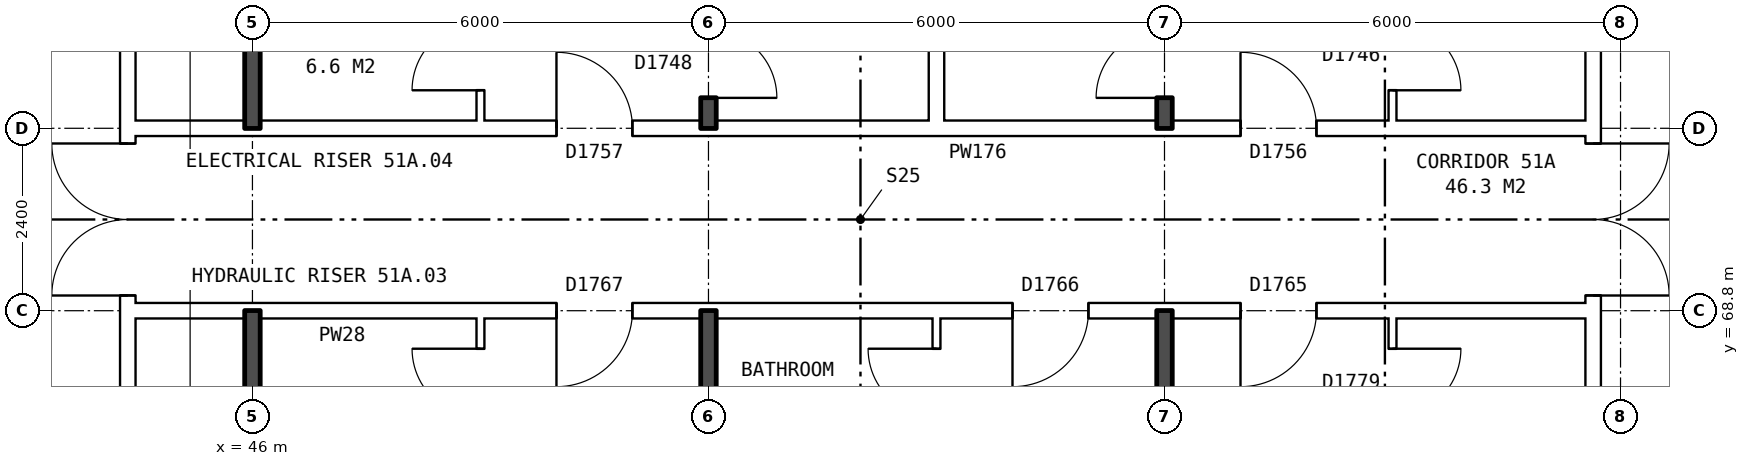
"""IFC4 building model, lengths in metres.
Left out: names, types, materials, properties, quantities, classifications, styles, units other than length and angle.
Written with IfcOpenShell. Run it as: python <this file> out.ifc"""

import sys

from ifc_helpers import new_model, si_unit, direction, frame, frame_2d, origin, place, context, subcontext, project, spatial, rectangle, extrude, element, fill, save


model = new_model("IFC4")
c1 = context("Model", 3, precision=1e-05, world=origin(), true_north=direction((0.0, 1.0)))
c2 = subcontext(c1, "Body", "Model", "MODEL_VIEW")
j1 = project(units=[si_unit("LENGTHUNIT", "METRE"), si_unit("PLANEANGLEUNIT", "RADIAN")], contexts=[c1])
p1 = place(None, origin())
s1 = spatial("IfcSite", under=j1, at=p1, CompositionType="ELEMENT")
p2 = place(p1, origin())
s2 = spatial("IfcBuilding", under=s1, at=p2, CompositionType="ELEMENT")
p3 = place(p2, frame((0.0, 0.0, 182.0)))
s3 = spatial("IfcBuildingStorey", under=s2, at=p3, CompositionType="ELEMENT", Elevation=182.0)
p4 = place(p3, frame((63.64, 63.9, 0.0), z_axis=(0.0, 0.0, 1.0), x_axis=(0.0, 1.0, 0.0)))
e1 = element("IfcWall", 1, at=p4, inside=s3, PredefinedType="PARTITIONING", context=c2, shape_type="SweptSolid", body=[
    extrude(rectangle(XDim=12.2, YDim=0.2, at=frame_2d((6.1, 0.0))), origin(), (0.0, 0.0, 1.0), 2.85),
])
p5 = place(p4, frame((5.1, 0.0, 0.0)))
e2 = element("IfcOpeningElement", 2, at=p5, cuts=e1, PredefinedType="OPENING", context=c2, shape_type="SweptSolid", body=[
    extrude(rectangle(XDim=2.0, YDim=2.1, at=frame_2d((1.0, 1.05))), frame((0.0, 0.11, 0.0), z_axis=(0.0, -1.0, 0.0), x_axis=(1.0, 0.0, 0.0)), (0.0, 0.0, 1.0), 0.22),
])
p6 = place(p3, frame((44.36, 63.9, 0.0), z_axis=(0.0, 0.0, 1.0), x_axis=(0.0, 1.0, 0.0)))
e3 = element("IfcWall", 3, at=p6, inside=s3, PredefinedType="PARTITIONING", context=c2, shape_type="SweptSolid", body=[
    extrude(rectangle(XDim=12.2, YDim=0.2, at=frame_2d((6.1, 0.0))), origin(), (0.0, 0.0, 1.0), 2.85),
])
p7 = place(p6, frame((5.1, 0.0, 0.0)))
e4 = element("IfcOpeningElement", 4, at=p7, cuts=e3, PredefinedType="OPENING", context=c2, shape_type="SweptSolid", body=[
    extrude(rectangle(XDim=2.0, YDim=2.1, at=frame_2d((1.0, 1.05))), frame((0.0, 0.11, 0.0), z_axis=(0.0, -1.0, 0.0), x_axis=(1.0, 0.0, 0.0)), (0.0, 0.0, 1.0), 0.22),
])
p8 = place(p3, frame((44.36, 68.8, 0.0), z_axis=(0.0, 0.0, 1.0), x_axis=(1.0, 0.0, 0.0)))
e5 = element("IfcWall", 5, at=p8, inside=s3, PredefinedType="PARTITIONING", context=c2, shape_type="SweptSolid", body=[
    extrude(rectangle(XDim=19.28, YDim=0.2, at=frame_2d((9.64, 0.0))), origin(), (0.0, 0.0, 1.0), 2.85),
])
p9 = place(p8, frame((14.64, 0.0, 0.0)))
e6 = element("IfcOpeningElement", 6, at=p9, cuts=e5, PredefinedType="OPENING", context=c2, shape_type="SweptSolid", body=[
    extrude(rectangle(XDim=1.0, YDim=2.1, at=frame_2d((0.5, 1.05))), frame((0.0, 0.11, 0.0), z_axis=(0.0, -1.0, 0.0), x_axis=(1.0, 0.0, 0.0)), (0.0, 0.0, 1.0), 0.22),
])
p10 = place(p8, frame((11.64, 0.0, 0.0)))
e7 = element("IfcOpeningElement", 7, at=p10, cuts=e5, PredefinedType="OPENING", context=c2, shape_type="SweptSolid", body=[
    extrude(rectangle(XDim=1.0, YDim=2.1, at=frame_2d((0.5, 1.05))), frame((0.0, 0.11, 0.0), z_axis=(0.0, -1.0, 0.0), x_axis=(1.0, 0.0, 0.0)), (0.0, 0.0, 1.0), 0.22),
])
p11 = place(p8, frame((5.64, 0.0, 0.0)))
e8 = element("IfcOpeningElement", 8, at=p11, cuts=e5, PredefinedType="OPENING", context=c2, shape_type="SweptSolid", body=[
    extrude(rectangle(XDim=1.0, YDim=2.1, at=frame_2d((0.5, 1.05))), frame((0.0, 0.11, 0.0), z_axis=(0.0, -1.0, 0.0), x_axis=(1.0, 0.0, 0.0)), (0.0, 0.0, 1.0), 0.22),
])
p12 = place(p3, frame((44.36, 71.2, 0.0), z_axis=(0.0, 0.0, 1.0), x_axis=(1.0, 0.0, 0.0)))
e9 = element("IfcWall", 9, at=p12, inside=s3, PredefinedType="PARTITIONING", context=c2, shape_type="SweptSolid", body=[
    extrude(rectangle(XDim=19.28, YDim=0.2, at=frame_2d((9.64, 0.0))), origin(), (0.0, 0.0, 1.0), 2.85),
])
p13 = place(p12, frame((14.64, 0.0, 0.0)))
e10 = element("IfcOpeningElement", 10, at=p13, cuts=e9, PredefinedType="OPENING", context=c2, shape_type="SweptSolid", body=[
    extrude(rectangle(XDim=1.0, YDim=2.1, at=frame_2d((0.5, 1.05))), frame((0.0, 0.11, 0.0), z_axis=(0.0, -1.0, 0.0), x_axis=(1.0, 0.0, 0.0)), (0.0, 0.0, 1.0), 0.22),
])
p14 = place(p12, frame((5.64, 0.0, 0.0)))
e11 = element("IfcOpeningElement", 11, at=p14, cuts=e9, PredefinedType="OPENING", context=c2, shape_type="SweptSolid", body=[
    extrude(rectangle(XDim=1.0, YDim=2.1, at=frame_2d((0.5, 1.05))), frame((0.0, 0.11, 0.0), z_axis=(0.0, -1.0, 0.0), x_axis=(1.0, 0.0, 0.0)), (0.0, 0.0, 1.0), 0.22),
])
for number, where, z_axis, x_axis in (
    (12, (46.0, 63.8, 0.0), (0.0, 0.0, 1.0), (0.0, 1.0, 0.0)),
    (13, (46.0, 71.2, 0.0), (0.0, 0.0, 1.0), (0.0, 1.0, 0.0)),
):
    element("IfcWall", number, at=place(p3, frame(where, z_axis=z_axis, x_axis=x_axis)), inside=s3, PredefinedType="SOLIDWALL", context=c2, shape_type="SweptSolid", body=[
        extrude(rectangle(XDim=5.0, YDim=0.2, at=frame_2d((2.5, 0.0))), origin(), (0.0, 0.0, 1.0), 2.85),
    ])
p15 = place(p3, frame((49.0, 54.36, 0.0), z_axis=(0.0, 0.0, 1.0), x_axis=(0.0, 1.0, 0.0)))
e14 = element("IfcWall", 14, at=p15, inside=s3, PredefinedType="PARTITIONING", context=c2, shape_type="SweptSolid", body=[
    extrude(rectangle(XDim=14.34, YDim=0.1, at=frame_2d((7.17, 0.0))), origin(), (0.0, 0.0, 1.0), 2.85),
])
p16 = place(p15, frame((6.7, 0.0, 0.0)))
e15 = element("IfcOpeningElement", 15, at=p16, cuts=e14, PredefinedType="OPENING", context=c2, shape_type="SweptSolid", body=[
    extrude(rectangle(XDim=0.9, YDim=2.1, at=frame_2d((0.45, 1.05))), frame((0.0, 0.06, 0.0), z_axis=(0.0, -1.0, 0.0), x_axis=(1.0, 0.0, 0.0)), (0.0, 0.0, 1.0), 0.12),
])
p17 = place(p15, frame((13.04, 0.0, 0.0)))
e16 = element("IfcOpeningElement", 16, at=p17, cuts=e14, PredefinedType="OPENING", context=c2, shape_type="SweptSolid", body=[
    extrude(rectangle(XDim=0.9, YDim=2.1, at=frame_2d((0.45, 1.05))), frame((0.0, 0.06, 0.0), z_axis=(0.0, -1.0, 0.0), x_axis=(1.0, 0.0, 0.0)), (0.0, 0.0, 1.0), 0.12),
])
p18 = place(p3, frame((49.0, 71.3, 0.0), z_axis=(0.0, 0.0, 1.0), x_axis=(0.0, 1.0, 0.0)))
e17 = element("IfcWall", 17, at=p18, inside=s3, PredefinedType="PARTITIONING", context=c2, shape_type="SweptSolid", body=[
    extrude(rectangle(XDim=14.34, YDim=0.1, at=frame_2d((7.17, 0.0))), origin(), (0.0, 0.0, 1.0), 2.85),
])
p19 = place(p18, frame((9.24, 0.0, 0.0)))
e18 = element("IfcOpeningElement", 18, at=p19, cuts=e17, PredefinedType="OPENING", context=c2, shape_type="SweptSolid", body=[
    extrude(rectangle(XDim=0.9, YDim=2.1, at=frame_2d((0.45, 1.05))), frame((0.0, 0.06, 0.0), z_axis=(0.0, -1.0, 0.0), x_axis=(1.0, 0.0, 0.0)), (0.0, 0.0, 1.0), 0.12),
])
p20 = place(p18, frame((0.4, 0.0, 0.0)))
e19 = element("IfcOpeningElement", 19, at=p20, cuts=e17, PredefinedType="OPENING", context=c2, shape_type="SweptSolid", body=[
    extrude(rectangle(XDim=0.9, YDim=2.1, at=frame_2d((0.45, 1.05))), frame((0.0, 0.06, 0.0), z_axis=(0.0, -1.0, 0.0), x_axis=(1.0, 0.0, 0.0)), (0.0, 0.0, 1.0), 0.12),
])
p21 = place(p3, frame((52.0, 54.36, 0.0), z_axis=(0.0, 0.0, 1.0), x_axis=(0.0, 1.0, 0.0)))
e20 = element("IfcWall", 20, at=p21, inside=s3, PredefinedType="SOLIDWALL", context=c2, shape_type="SweptSolid", body=[
    extrude(rectangle(XDim=14.44, YDim=0.2, at=frame_2d((7.22, 0.0))), origin(), (0.0, 0.0, 1.0), 2.85),
])
p22 = place(p3, frame((52.0, 71.2, 0.0), z_axis=(0.0, 0.0, 1.0), x_axis=(0.0, 1.0, 0.0)))
e21 = element("IfcWall", 21, at=p22, inside=s3, PredefinedType="SOLIDWALL", context=c2, shape_type="SweptSolid", body=[
    extrude(rectangle(XDim=14.44, YDim=0.2, at=frame_2d((7.22, 0.0))), origin(), (0.0, 0.0, 1.0), 2.85),
])
p23 = place(p22, frame((9.34, 0.0, 0.0)))
e22 = element("IfcOpeningElement", 22, at=p23, cuts=e21, PredefinedType="OPENING", context=c2, shape_type="SweptSolid", body=[
    extrude(rectangle(XDim=0.9, YDim=2.1, at=frame_2d((0.45, 1.05))), frame((0.0, 0.11, 0.0), z_axis=(0.0, -1.0, 0.0), x_axis=(1.0, 0.0, 0.0)), (0.0, 0.0, 1.0), 0.22),
])
p24 = place(p22, frame((0.4, 0.0, 0.0)))
e23 = element("IfcOpeningElement", 23, at=p24, cuts=e21, PredefinedType="OPENING", context=c2, shape_type="SweptSolid", body=[
    extrude(rectangle(XDim=0.9, YDim=2.1, at=frame_2d((0.45, 1.05))), frame((0.0, 0.11, 0.0), z_axis=(0.0, -1.0, 0.0), x_axis=(1.0, 0.0, 0.0)), (0.0, 0.0, 1.0), 0.22),
])
p25 = place(p3, frame((55.0, 54.36, 0.0), z_axis=(0.0, 0.0, 1.0), x_axis=(0.0, 1.0, 0.0)))
e24 = element("IfcWall", 24, at=p25, inside=s3, PredefinedType="PARTITIONING", context=c2, shape_type="SweptSolid", body=[
    extrude(rectangle(XDim=14.34, YDim=0.1, at=frame_2d((7.17, 0.0))), origin(), (0.0, 0.0, 1.0), 2.85),
])
p26 = place(p25, frame((4.2, 0.0, 0.0)))
e25 = element("IfcOpeningElement", 25, at=p26, cuts=e24, PredefinedType="OPENING", context=c2, shape_type="SweptSolid", body=[
    extrude(rectangle(XDim=0.9, YDim=2.1, at=frame_2d((0.45, 1.05))), frame((0.0, 0.06, 0.0), z_axis=(0.0, -1.0, 0.0), x_axis=(1.0, 0.0, 0.0)), (0.0, 0.0, 1.0), 0.12),
])
p27 = place(p25, frame((13.04, 0.0, 0.0)))
e26 = element("IfcOpeningElement", 26, at=p27, cuts=e24, PredefinedType="OPENING", context=c2, shape_type="SweptSolid", body=[
    extrude(rectangle(XDim=0.9, YDim=2.1, at=frame_2d((0.45, 1.05))), frame((0.0, 0.06, 0.0), z_axis=(0.0, -1.0, 0.0), x_axis=(1.0, 0.0, 0.0)), (0.0, 0.0, 1.0), 0.12),
])
p28 = place(p3, frame((55.0, 71.3, 0.0), z_axis=(0.0, 0.0, 1.0), x_axis=(0.0, 1.0, 0.0)))
e27 = element("IfcWall", 27, at=p28, inside=s3, PredefinedType="PARTITIONING", context=c2, shape_type="SweptSolid", body=[
    extrude(rectangle(XDim=14.34, YDim=0.2, at=frame_2d((7.17, 0.0))), origin(), (0.0, 0.0, 1.0), 2.85),
])
p29 = place(p3, frame((58.0, 54.36, 0.0), z_axis=(0.0, 0.0, 1.0), x_axis=(0.0, 1.0, 0.0)))
e28 = element("IfcWall", 28, at=p29, inside=s3, PredefinedType="SOLIDWALL", context=c2, shape_type="SweptSolid", body=[
    extrude(rectangle(XDim=14.44, YDim=0.2, at=frame_2d((7.22, 0.0))), origin(), (0.0, 0.0, 1.0), 2.85),
])
p30 = place(p3, frame((58.0, 71.2, 0.0), z_axis=(0.0, 0.0, 1.0), x_axis=(0.0, 1.0, 0.0)))
e29 = element("IfcWall", 29, at=p30, inside=s3, PredefinedType="SOLIDWALL", context=c2, shape_type="SweptSolid", body=[
    extrude(rectangle(XDim=14.44, YDim=0.2, at=frame_2d((7.22, 0.0))), origin(), (0.0, 0.0, 1.0), 2.85),
])
p31 = place(p30, frame((9.34, 0.0, 0.0)))
e30 = element("IfcOpeningElement", 30, at=p31, cuts=e29, PredefinedType="OPENING", context=c2, shape_type="SweptSolid", body=[
    extrude(rectangle(XDim=0.9, YDim=2.1, at=frame_2d((0.45, 1.05))), frame((0.0, 0.11, 0.0), z_axis=(0.0, -1.0, 0.0), x_axis=(1.0, 0.0, 0.0)), (0.0, 0.0, 1.0), 0.22),
])
p32 = place(p30, frame((0.4, 0.0, 0.0)))
e31 = element("IfcOpeningElement", 31, at=p32, cuts=e29, PredefinedType="OPENING", context=c2, shape_type="SweptSolid", body=[
    extrude(rectangle(XDim=0.9, YDim=2.1, at=frame_2d((0.45, 1.05))), frame((0.0, 0.11, 0.0), z_axis=(0.0, -1.0, 0.0), x_axis=(1.0, 0.0, 0.0)), (0.0, 0.0, 1.0), 0.22),
])
p33 = place(p3, frame((61.0, 54.36, 0.0), z_axis=(0.0, 0.0, 1.0), x_axis=(0.0, 1.0, 0.0)))
e32 = element("IfcWall", 32, at=p33, inside=s3, PredefinedType="PARTITIONING", context=c2, shape_type="SweptSolid", body=[
    extrude(rectangle(XDim=14.34, YDim=0.1, at=frame_2d((7.17, 0.0))), origin(), (0.0, 0.0, 1.0), 2.85),
])
p34 = place(p33, frame((6.7, 0.0, 0.0)))
e33 = element("IfcOpeningElement", 33, at=p34, cuts=e32, PredefinedType="OPENING", context=c2, shape_type="SweptSolid", body=[
    extrude(rectangle(XDim=0.9, YDim=2.1, at=frame_2d((0.45, 1.05))), frame((0.0, 0.06, 0.0), z_axis=(0.0, -1.0, 0.0), x_axis=(1.0, 0.0, 0.0)), (0.0, 0.0, 1.0), 0.12),
])
p35 = place(p33, frame((13.04, 0.0, 0.0)))
e34 = element("IfcOpeningElement", 34, at=p35, cuts=e32, PredefinedType="OPENING", context=c2, shape_type="SweptSolid", body=[
    extrude(rectangle(XDim=0.9, YDim=2.1, at=frame_2d((0.45, 1.05))), frame((0.0, 0.06, 0.0), z_axis=(0.0, -1.0, 0.0), x_axis=(1.0, 0.0, 0.0)), (0.0, 0.0, 1.0), 0.12),
])
p36 = place(p3, frame((61.0, 71.3, 0.0), z_axis=(0.0, 0.0, 1.0), x_axis=(0.0, 1.0, 0.0)))
e35 = element("IfcWall", 35, at=p36, inside=s3, PredefinedType="PARTITIONING", context=c2, shape_type="SweptSolid", body=[
    extrude(rectangle(XDim=14.34, YDim=0.1, at=frame_2d((7.17, 0.0))), origin(), (0.0, 0.0, 1.0), 2.85),
])
p37 = place(p36, frame((9.24, 0.0, 0.0)))
e36 = element("IfcOpeningElement", 36, at=p37, cuts=e35, PredefinedType="OPENING", context=c2, shape_type="SweptSolid", body=[
    extrude(rectangle(XDim=0.9, YDim=2.1, at=frame_2d((0.45, 1.05))), frame((0.0, 0.06, 0.0), z_axis=(0.0, -1.0, 0.0), x_axis=(1.0, 0.0, 0.0)), (0.0, 0.0, 1.0), 0.12),
])
p38 = place(p36, frame((0.4, 0.0, 0.0)))
e37 = element("IfcOpeningElement", 37, at=p38, cuts=e35, PredefinedType="OPENING", context=c2, shape_type="SweptSolid", body=[
    extrude(rectangle(XDim=0.9, YDim=2.1, at=frame_2d((0.45, 1.05))), frame((0.0, 0.06, 0.0), z_axis=(0.0, -1.0, 0.0), x_axis=(1.0, 0.0, 0.0)), (0.0, 0.0, 1.0), 0.12),
])
p39 = place(p5, frame((2.0, 0.0, 0.0), z_axis=(0.0, 0.0, 1.0), x_axis=(-1.0, 0.0, 0.0)))
e38 = element("IfcDoor", 38, at=p39, inside=s3, OperationType="DOUBLE_DOOR_SINGLE_SWING", PredefinedType="DOOR", context=c2, shape_type="SweptSolid", body=[
    extrude(rectangle(XDim=2.0, YDim=2.1, at=frame_2d((1.0, 1.05))), frame((0.0, 0.025, 0.0), z_axis=(0.0, -1.0, 0.0), x_axis=(1.0, 0.0, 0.0)), (0.0, 0.0, 1.0), 0.05),
])
fill(e2, e38)
p40 = place(p7, origin())
e39 = element("IfcDoor", 39, at=p40, inside=s3, OperationType="DOUBLE_DOOR_SINGLE_SWING", PredefinedType="DOOR", context=c2, shape_type="SweptSolid", body=[
    extrude(rectangle(XDim=2.0, YDim=2.1, at=frame_2d((1.0, 1.05))), frame((0.0, 0.025, 0.0), z_axis=(0.0, -1.0, 0.0), x_axis=(1.0, 0.0, 0.0)), (0.0, 0.0, 1.0), 0.05),
])
fill(e4, e39)
p41 = place(p9, frame((1.0, 0.0, 0.0), z_axis=(0.0, 0.0, 1.0), x_axis=(-1.0, 0.0, 0.0)))
e40 = element("IfcDoor", 40, at=p41, inside=s3, OperationType="SINGLE_SWING_RIGHT", PredefinedType="DOOR", context=c2, shape_type="SweptSolid", body=[
    extrude(rectangle(XDim=1.0, YDim=2.1, at=frame_2d((0.5, 1.05))), frame((0.0, 0.025, 0.0), z_axis=(0.0, -1.0, 0.0), x_axis=(1.0, 0.0, 0.0)), (0.0, 0.0, 1.0), 0.05),
])
fill(e6, e40)
p42 = place(p35, frame((0.9, 0.0, 0.0), z_axis=(0.0, 0.0, 1.0), x_axis=(-1.0, 0.0, 0.0)))
e41 = element("IfcDoor", 41, at=p42, inside=s3, OperationType="SINGLE_SWING_LEFT", PredefinedType="DOOR", context=c2, shape_type="SweptSolid", body=[
    extrude(rectangle(XDim=0.9, YDim=2.1, at=frame_2d((0.45, 1.05))), frame((0.0, 0.025, 0.0), z_axis=(0.0, -1.0, 0.0), x_axis=(1.0, 0.0, 0.0)), (0.0, 0.0, 1.0), 0.05),
])
fill(e34, e41)
p43 = place(p10, frame((1.0, 0.0, 0.0), z_axis=(0.0, 0.0, 1.0), x_axis=(-1.0, 0.0, 0.0)))
e42 = element("IfcDoor", 42, at=p43, inside=s3, OperationType="SINGLE_SWING_RIGHT", PredefinedType="DOOR", context=c2, shape_type="SweptSolid", body=[
    extrude(rectangle(XDim=1.0, YDim=2.1, at=frame_2d((0.5, 1.05))), frame((0.0, 0.025, 0.0), z_axis=(0.0, -1.0, 0.0), x_axis=(1.0, 0.0, 0.0)), (0.0, 0.0, 1.0), 0.05),
])
fill(e7, e42)
p44 = place(p27, origin())
e43 = element("IfcDoor", 43, at=p44, inside=s3, OperationType="SINGLE_SWING_RIGHT", PredefinedType="DOOR", context=c2, shape_type="SweptSolid", body=[
    extrude(rectangle(XDim=0.9, YDim=2.1, at=frame_2d((0.45, 1.05))), frame((0.0, 0.025, 0.0), z_axis=(0.0, -1.0, 0.0), x_axis=(1.0, 0.0, 0.0)), (0.0, 0.0, 1.0), 0.05),
])
fill(e26, e43)
p45 = place(p11, frame((1.0, 0.0, 0.0), z_axis=(0.0, 0.0, 1.0), x_axis=(-1.0, 0.0, 0.0)))
e44 = element("IfcDoor", 44, at=p45, inside=s3, OperationType="SINGLE_SWING_RIGHT", PredefinedType="DOOR", context=c2, shape_type="SweptSolid", body=[
    extrude(rectangle(XDim=1.0, YDim=2.1, at=frame_2d((0.5, 1.05))), frame((0.0, 0.025, 0.0), z_axis=(0.0, -1.0, 0.0), x_axis=(1.0, 0.0, 0.0)), (0.0, 0.0, 1.0), 0.05),
])
fill(e8, e44)
p46 = place(p17, origin())
e45 = element("IfcDoor", 45, at=p46, inside=s3, OperationType="SINGLE_SWING_RIGHT", PredefinedType="DOOR", context=c2, shape_type="SweptSolid", body=[
    extrude(rectangle(XDim=0.9, YDim=2.1, at=frame_2d((0.45, 1.05))), frame((0.0, 0.025, 0.0), z_axis=(0.0, -1.0, 0.0), x_axis=(1.0, 0.0, 0.0)), (0.0, 0.0, 1.0), 0.05),
])
fill(e16, e45)
p47 = place(p13, origin())
e46 = element("IfcDoor", 46, at=p47, inside=s3, OperationType="SINGLE_SWING_LEFT", PredefinedType="DOOR", context=c2, shape_type="SweptSolid", body=[
    extrude(rectangle(XDim=1.0, YDim=2.1, at=frame_2d((0.5, 1.05))), frame((0.0, 0.025, 0.0), z_axis=(0.0, -1.0, 0.0), x_axis=(1.0, 0.0, 0.0)), (0.0, 0.0, 1.0), 0.05),
])
fill(e10, e46)
p48 = place(p38, frame((0.9, 0.0, 0.0), z_axis=(0.0, 0.0, 1.0), x_axis=(-1.0, 0.0, 0.0)))
e47 = element("IfcDoor", 47, at=p48, inside=s3, OperationType="SINGLE_SWING_RIGHT", PredefinedType="DOOR", context=c2, shape_type="SweptSolid", body=[
    extrude(rectangle(XDim=0.9, YDim=2.1, at=frame_2d((0.45, 1.05))), frame((0.0, 0.025, 0.0), z_axis=(0.0, -1.0, 0.0), x_axis=(1.0, 0.0, 0.0)), (0.0, 0.0, 1.0), 0.05),
])
fill(e37, e47)
p49 = place(p32, origin())
e48 = element("IfcDoor", 48, at=p49, inside=s3, OperationType="SINGLE_SWING_LEFT", PredefinedType="DOOR", context=c2, shape_type="SweptSolid", body=[
    extrude(rectangle(XDim=0.9, YDim=2.1, at=frame_2d((0.45, 1.05))), frame((0.0, 0.025, 0.0), z_axis=(0.0, -1.0, 0.0), x_axis=(1.0, 0.0, 0.0)), (0.0, 0.0, 1.0), 0.05),
])
fill(e31, e48)
p50 = place(p14, origin())
e49 = element("IfcDoor", 49, at=p50, inside=s3, OperationType="SINGLE_SWING_LEFT", PredefinedType="DOOR", context=c2, shape_type="SweptSolid", body=[
    extrude(rectangle(XDim=1.0, YDim=2.1, at=frame_2d((0.5, 1.05))), frame((0.0, 0.025, 0.0), z_axis=(0.0, -1.0, 0.0), x_axis=(1.0, 0.0, 0.0)), (0.0, 0.0, 1.0), 0.05),
])
fill(e11, e49)
p51 = place(p24, frame((0.9, 0.0, 0.0), z_axis=(0.0, 0.0, 1.0), x_axis=(-1.0, 0.0, 0.0)))
e50 = element("IfcDoor", 50, at=p51, inside=s3, OperationType="SINGLE_SWING_RIGHT", PredefinedType="DOOR", context=c2, shape_type="SweptSolid", body=[
    extrude(rectangle(XDim=0.9, YDim=2.1, at=frame_2d((0.45, 1.05))), frame((0.0, 0.025, 0.0), z_axis=(0.0, -1.0, 0.0), x_axis=(1.0, 0.0, 0.0)), (0.0, 0.0, 1.0), 0.05),
])
fill(e23, e50)
p52 = place(p20, origin())
e51 = element("IfcDoor", 51, at=p52, inside=s3, OperationType="SINGLE_SWING_LEFT", PredefinedType="DOOR", context=c2, shape_type="SweptSolid", body=[
    extrude(rectangle(XDim=0.9, YDim=2.1, at=frame_2d((0.45, 1.05))), frame((0.0, 0.025, 0.0), z_axis=(0.0, -1.0, 0.0), x_axis=(1.0, 0.0, 0.0)), (0.0, 0.0, 1.0), 0.05),
])
fill(e19, e51)
save(model, sys.argv[1])
